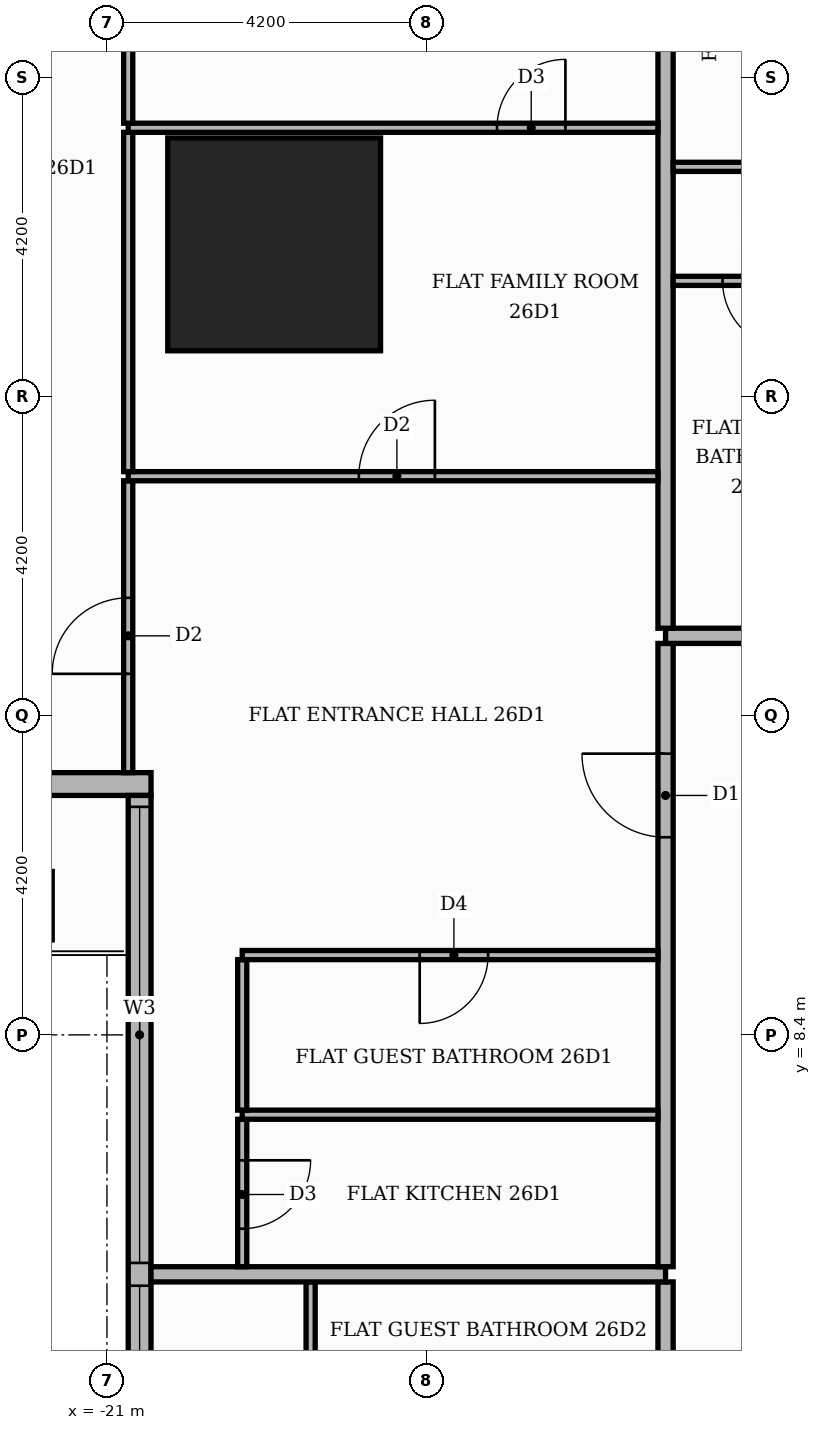
"""IFC4 building model, lengths in metres.
Left out: names, types, materials, properties, quantities, classifications, styles, units other than length and angle.
Written with IfcOpenShell. Run it as: python <this file> out.ifc"""

import sys

from ifc_helpers import new_model, si_unit, direction, frame, frame_2d, origin, origin_2d, place, context, subcontext, project, spatial, rectangle, extrude, element, fill, save


model = new_model("IFC4")
c1 = context("Model", 3, precision=1e-05, world=origin(), true_north=direction((0.0, 1.0)))
c2 = subcontext(c1, "Body", "Model", "MODEL_VIEW")
j1 = project(units=[si_unit("LENGTHUNIT", "METRE"), si_unit("PLANEANGLEUNIT", "RADIAN")], contexts=[c1])
p1 = place(None, origin())
s1 = spatial("IfcSite", under=j1, at=p1, CompositionType="ELEMENT")
p2 = place(p1, origin())
s2 = spatial("IfcBuilding", under=s1, at=p2, CompositionType="ELEMENT")
p3 = place(p2, frame((0.0, 0.0, 110.4)))
s3 = spatial("IfcBuildingStorey", under=s2, at=p3, CompositionType="ELEMENT", Elevation=110.4)
p4 = place(p3, frame((-18.8, 18.8, 0.0), z_axis=(0.0, 0.0, 1.0), x_axis=(1.0, 0.0, 0.0)))
e1 = element("IfcColumn", 1, at=p4, inside=s3, PredefinedType="COLUMN", context=c2, shape_type="SweptSolid", body=[
    extrude(rectangle(XDim=2.8, YDim=2.8, at=origin_2d()), origin(), (0.0, 0.0, 1.0), 3.9),
])
p5 = place(p3, frame((-25.42, 11.7, 0.0), z_axis=(0.0, 0.0, 1.0), x_axis=(1.0, 0.0, 0.0)))
e2 = element("IfcWall", 2, at=p5, inside=s3, PredefinedType="STANDARD", context=c2, shape_type="SweptSolid", body=[
    extrude(rectangle(XDim=5.0, YDim=0.3, at=frame_2d((2.5, 0.0))), origin(), (0.0, 0.0, 1.0), 3.48),
])
p6 = place(p5, frame((1.42, 0.0, 0.0)))
e3 = element("IfcOpeningElement", 3, at=p6, cuts=e2, PredefinedType="OPENING", context=c2, shape_type="SweptSolid", body=[
    extrude(rectangle(XDim=1.8, YDim=2.4, at=frame_2d((0.9, 1.2))), frame((0.0, 0.16, 0.0), z_axis=(0.0, -1.0, 0.0), x_axis=(1.0, 0.0, 0.0)), (0.0, 0.0, 1.0), 0.32),
])
p7 = place(p3, frame((-20.57, 11.55, 0.0), z_axis=(0.0, 0.0, 1.0), x_axis=(0.0, -1.0, 0.0)))
e4 = element("IfcWall", 4, at=p7, inside=s3, PredefinedType="STANDARD", context=c2, shape_type="SweptSolid", body=[
    extrude(rectangle(XDim=23.4, YDim=0.3, at=frame_2d((11.7, 0.0))), origin(), (0.0, 0.0, 1.0), 3.48),
])
p8 = place(p7, frame((0.15, 0.0, 0.9)))
e5 = element("IfcOpeningElement", 5, at=p8, cuts=e4, PredefinedType="OPENING", context=c2, shape_type="SweptSolid", body=[
    extrude(rectangle(XDim=6.0, YDim=2.1, at=frame_2d((3.0, 1.05))), frame((0.0, 0.16, 0.0), z_axis=(0.0, -1.0, 0.0), x_axis=(1.0, 0.0, 0.0)), (0.0, 0.0, 1.0), 0.32),
])
p9 = place(p7, frame((6.45, 0.0, 0.9)))
e6 = element("IfcOpeningElement", 6, at=p9, cuts=e4, PredefinedType="OPENING", context=c2, shape_type="SweptSolid", body=[
    extrude(rectangle(XDim=6.0, YDim=2.1, at=frame_2d((3.0, 1.05))), frame((0.0, 0.16, 0.0), z_axis=(0.0, -1.0, 0.0), x_axis=(1.0, 0.0, 0.0)), (0.0, 0.0, 1.0), 0.32),
])
p10 = place(p7, frame((12.75, 0.0, 0.9)))
e7 = element("IfcOpeningElement", 7, at=p10, cuts=e4, PredefinedType="OPENING", context=c2, shape_type="SweptSolid", body=[
    extrude(rectangle(XDim=6.0, YDim=2.1, at=frame_2d((3.0, 1.05))), frame((0.0, 0.16, 0.0), z_axis=(0.0, -1.0, 0.0), x_axis=(1.0, 0.0, 0.0)), (0.0, 0.0, 1.0), 0.32),
])
p11 = place(p7, frame((19.05, 0.0, 0.9)))
e8 = element("IfcOpeningElement", 8, at=p11, cuts=e4, PredefinedType="OPENING", context=c2, shape_type="SweptSolid", body=[
    extrude(rectangle(XDim=3.9, YDim=2.1, at=frame_2d((1.95, 1.05))), frame((0.0, 0.16, 0.0), z_axis=(0.0, -1.0, 0.0), x_axis=(1.0, 0.0, 0.0)), (0.0, 0.0, 1.0), 0.32),
])
p12 = place(p3, frame((-13.65, -13.55, 0.0), z_axis=(0.0, 0.0, 1.0), x_axis=(0.0, 1.0, 0.0)))
e9 = element("IfcWall", 9, at=p12, inside=s3, PredefinedType="PARTITIONING", context=c2, shape_type="SweptSolid", body=[
    extrude(rectangle(XDim=18.7, YDim=0.2, at=frame_2d((9.35, 0.0))), origin(), (0.0, 0.0, 1.0), 3.48),
])
p13 = place(p12, frame((14.05, 0.0, 0.0)))
e10 = element("IfcOpeningElement", 10, at=p13, cuts=e9, PredefinedType="OPENING", context=c2, shape_type="SweptSolid", body=[
    extrude(rectangle(XDim=1.1, YDim=2.4, at=frame_2d((0.55, 1.2))), frame((0.0, 0.11, 0.0), z_axis=(0.0, -1.0, 0.0), x_axis=(1.0, 0.0, 0.0)), (0.0, 0.0, 1.0), 0.22),
])
p14 = place(p3, frame((-18.32, 3.21, 0.0), z_axis=(0.0, 0.0, 1.0), x_axis=(0.0, 1.0, 0.0)))
e11 = element("IfcWall", 11, at=p14, inside=s3, PredefinedType="PARTITIONING", context=c2, shape_type="SweptSolid", body=[
    extrude(rectangle(XDim=1.94, YDim=0.12, at=frame_2d((0.97, 0.0))), origin(), (0.0, 0.0, 1.0), 3.48),
])
p15 = place(p3, frame((-20.42, 5.25, 0.0), z_axis=(0.0, 0.0, 1.0), x_axis=(1.0, 0.0, 0.0)))
e12 = element("IfcWall", 12, at=p15, inside=s3, PredefinedType="PARTITIONING", context=c2, shape_type="SweptSolid", body=[
    extrude(rectangle(XDim=6.77, YDim=0.2, at=frame_2d((3.385, 0.0))), origin(), (0.0, 0.0, 1.0), 3.48),
])
p16 = place(p3, frame((-19.22, 5.35, 0.0), z_axis=(0.0, 0.0, 1.0), x_axis=(0.0, 1.0, 0.0)))
e13 = element("IfcWall", 13, at=p16, inside=s3, PredefinedType="PARTITIONING", context=c2, shape_type="SweptSolid", body=[
    extrude(rectangle(XDim=1.94, YDim=0.12, at=frame_2d((0.97, 0.0))), origin(), (0.0, 0.0, 1.0), 3.48),
])
p17 = place(p16, frame((0.5, 0.0, 0.0)))
e14 = element("IfcOpeningElement", 14, at=p17, cuts=e13, PredefinedType="OPENING", context=c2, shape_type="SweptSolid", body=[
    extrude(rectangle(XDim=0.9, YDim=2.1, at=frame_2d((0.45, 1.05))), frame((0.0, 0.07, 0.0), z_axis=(0.0, -1.0, 0.0), x_axis=(1.0, 0.0, 0.0)), (0.0, 0.0, 1.0), 0.14),
])
p18 = place(p3, frame((-13.65, 5.35, 0.0), z_axis=(0.0, 0.0, 1.0), x_axis=(0.0, 1.0, 0.0)))
e15 = element("IfcWall", 15, at=p18, inside=s3, PredefinedType="PARTITIONING", context=c2, shape_type="SweptSolid", body=[
    extrude(rectangle(XDim=8.2, YDim=0.2, at=frame_2d((4.1, 0.0))), origin(), (0.0, 0.0, 1.0), 3.48),
])
p19 = place(p18, frame((5.65, 0.0, 0.0)))
e16 = element("IfcOpeningElement", 16, at=p19, cuts=e15, PredefinedType="OPENING", context=c2, shape_type="SweptSolid", body=[
    extrude(rectangle(XDim=1.1, YDim=2.4, at=frame_2d((0.55, 1.2))), frame((0.0, 0.11, 0.0), z_axis=(0.0, -1.0, 0.0), x_axis=(1.0, 0.0, 0.0)), (0.0, 0.0, 1.0), 0.22),
])
p20 = place(p3, frame((-19.22, 7.35, 0.0), z_axis=(0.0, 0.0, 1.0), x_axis=(1.0, 0.0, 0.0)))
e17 = element("IfcWall", 17, at=p20, inside=s3, PredefinedType="PARTITIONING", context=c2, shape_type="SweptSolid", body=[
    extrude(rectangle(XDim=5.47, YDim=0.12, at=frame_2d((2.735, 0.0))), origin(), (0.0, 0.0, 1.0), 3.48),
])
p21 = place(p3, frame((-19.22, 7.41, 0.0), z_axis=(0.0, 0.0, 1.0), x_axis=(0.0, 1.0, 0.0)))
e18 = element("IfcWall", 18, at=p21, inside=s3, PredefinedType="PARTITIONING", context=c2, shape_type="SweptSolid", body=[
    extrude(rectangle(XDim=1.98, YDim=0.12, at=frame_2d((0.99, 0.0))), origin(), (0.0, 0.0, 1.0), 3.48),
])
p22 = place(p3, frame((-19.22, 9.45, 0.0), z_axis=(0.0, 0.0, 1.0), x_axis=(1.0, 0.0, 0.0)))
e19 = element("IfcWall", 19, at=p22, inside=s3, PredefinedType="PARTITIONING", context=c2, shape_type="SweptSolid", body=[
    extrude(rectangle(XDim=5.47, YDim=0.12, at=frame_2d((2.735, 0.0))), origin(), (0.0, 0.0, 1.0), 3.48),
])
p23 = place(p22, frame((2.335, 0.0, 0.0)))
e20 = element("IfcOpeningElement", 20, at=p23, cuts=e19, PredefinedType="OPENING", context=c2, shape_type="SweptSolid", body=[
    extrude(rectangle(XDim=0.9, YDim=2.1, at=frame_2d((0.45, 1.05))), frame((0.0, 0.07, 0.0), z_axis=(0.0, -1.0, 0.0), x_axis=(1.0, 0.0, 0.0)), (0.0, 0.0, 1.0), 0.14),
])
p24 = place(p3, frame((-20.72, 11.85, 0.0), z_axis=(0.0, 0.0, 1.0), x_axis=(0.0, 1.0, 0.0)))
e21 = element("IfcWall", 21, at=p24, inside=s3, PredefinedType="PARTITIONING", context=c2, shape_type="SweptSolid", body=[
    extrude(rectangle(XDim=3.84, YDim=0.12, at=frame_2d((1.92, 0.0))), origin(), (0.0, 0.0, 1.0), 3.48),
])
p25 = place(p24, frame((1.3, 0.0, 0.0)))
e22 = element("IfcOpeningElement", 22, at=p25, cuts=e21, PredefinedType="OPENING", context=c2, shape_type="SweptSolid", body=[
    extrude(rectangle(XDim=1.0, YDim=2.1, at=frame_2d((0.5, 1.05))), frame((0.0, 0.07, 0.0), z_axis=(0.0, -1.0, 0.0), x_axis=(1.0, 0.0, 0.0)), (0.0, 0.0, 1.0), 0.14),
])
p26 = place(p3, frame((-13.65, 13.65, 0.0), z_axis=(0.0, 0.0, 1.0), x_axis=(1.0, 0.0, 0.0)))
e23 = element("IfcWall", 23, at=p26, inside=s3, PredefinedType="PARTITIONING", context=c2, shape_type="SweptSolid", body=[
    extrude(rectangle(XDim=39.07, YDim=0.2, at=frame_2d((19.535, 0.0))), origin(), (0.0, 0.0, 1.0), 3.48),
])
p27 = place(p26, frame((23.6, 0.0, 0.0)))
e24 = element("IfcOpeningElement", 24, at=p27, cuts=e23, PredefinedType="OPENING", context=c2, shape_type="SweptSolid", body=[
    extrude(rectangle(XDim=1.1, YDim=2.4, at=frame_2d((0.55, 1.2))), frame((0.0, 0.11, 0.0), z_axis=(0.0, -1.0, 0.0), x_axis=(1.0, 0.0, 0.0)), (0.0, 0.0, 1.0), 0.22),
])
p28 = place(p3, frame((-13.65, 13.75, 0.0), z_axis=(0.0, 0.0, 1.0), x_axis=(0.0, 1.0, 0.0)))
e25 = element("IfcWall", 25, at=p28, inside=s3, PredefinedType="PARTITIONING", context=c2, shape_type="SweptSolid", body=[
    extrude(rectangle(XDim=11.67, YDim=0.2, at=frame_2d((5.835, 0.0))), origin(), (0.0, 0.0, 1.0), 3.48),
])
p29 = place(p3, frame((-20.72, 15.75, 0.0), z_axis=(0.0, 0.0, 1.0), x_axis=(1.0, 0.0, 0.0)))
e26 = element("IfcWall", 26, at=p29, inside=s3, PredefinedType="PARTITIONING", context=c2, shape_type="SweptSolid", body=[
    extrude(rectangle(XDim=6.97, YDim=0.12, at=frame_2d((3.485, 0.0))), origin(), (0.0, 0.0, 1.0), 3.48),
])
p30 = place(p29, frame((3.035, 0.0, 0.0)))
e27 = element("IfcOpeningElement", 27, at=p30, cuts=e26, PredefinedType="OPENING", context=c2, shape_type="SweptSolid", body=[
    extrude(rectangle(XDim=1.0, YDim=2.1, at=frame_2d((0.5, 1.05))), frame((0.0, 0.07, 0.0), z_axis=(0.0, -1.0, 0.0), x_axis=(1.0, 0.0, 0.0)), (0.0, 0.0, 1.0), 0.14),
])
p31 = place(p3, frame((-20.72, 15.81, 0.0), z_axis=(0.0, 0.0, 1.0), x_axis=(0.0, 1.0, 0.0)))
e28 = element("IfcWall", 28, at=p31, inside=s3, PredefinedType="PARTITIONING", context=c2, shape_type="SweptSolid", body=[
    extrude(rectangle(XDim=4.464, YDim=0.12, at=frame_2d((2.232, 0.0))), origin(), (0.0, 0.0, 1.0), 3.48),
])
p32 = place(p3, frame((-13.55, 18.32, 0.0), z_axis=(0.0, 0.0, 1.0), x_axis=(1.0, 0.0, 0.0)))
e29 = element("IfcWall", 29, at=p32, inside=s3, PredefinedType="PARTITIONING", context=c2, shape_type="SweptSolid", body=[
    extrude(rectangle(XDim=20.9, YDim=0.12, at=frame_2d((10.45, 0.0))), origin(), (0.0, 0.0, 1.0), 3.48),
])
p33 = place(p32, frame((17.525, 0.0, 0.0)))
e30 = element("IfcOpeningElement", 30, at=p33, cuts=e29, PredefinedType="OPENING", context=c2, shape_type="SweptSolid", body=[
    extrude(rectangle(XDim=0.9, YDim=2.1, at=frame_2d((0.45, 1.05))), frame((0.0, 0.07, 0.0), z_axis=(0.0, -1.0, 0.0), x_axis=(1.0, 0.0, 0.0)), (0.0, 0.0, 1.0), 0.14),
])
p34 = place(p32, frame((12.5, 0.0, 0.0)))
e31 = element("IfcOpeningElement", 31, at=p34, cuts=e29, PredefinedType="OPENING", context=c2, shape_type="SweptSolid", body=[
    extrude(rectangle(XDim=0.9, YDim=2.1, at=frame_2d((0.45, 1.05))), frame((0.0, 0.07, 0.0), z_axis=(0.0, -1.0, 0.0), x_axis=(1.0, 0.0, 0.0)), (0.0, 0.0, 1.0), 0.14),
])
p35 = place(p32, frame((7.025, 0.0, 0.0)))
e32 = element("IfcOpeningElement", 32, at=p35, cuts=e29, PredefinedType="OPENING", context=c2, shape_type="SweptSolid", body=[
    extrude(rectangle(XDim=0.9, YDim=2.1, at=frame_2d((0.45, 1.05))), frame((0.0, 0.07, 0.0), z_axis=(0.0, -1.0, 0.0), x_axis=(1.0, 0.0, 0.0)), (0.0, 0.0, 1.0), 0.14),
])
p36 = place(p32, frame((2.75, 0.0, 0.0)))
e33 = element("IfcOpeningElement", 33, at=p36, cuts=e29, PredefinedType="OPENING", context=c2, shape_type="SweptSolid", body=[
    extrude(rectangle(XDim=0.9, YDim=2.1, at=frame_2d((0.45, 1.05))), frame((0.0, 0.07, 0.0), z_axis=(0.0, -1.0, 0.0), x_axis=(1.0, 0.0, 0.0)), (0.0, 0.0, 1.0), 0.14),
])
p37 = place(p32, frame((0.65, 0.0, 0.0)))
e34 = element("IfcOpeningElement", 34, at=p37, cuts=e29, PredefinedType="OPENING", context=c2, shape_type="SweptSolid", body=[
    extrude(rectangle(XDim=0.9, YDim=2.1, at=frame_2d((0.45, 1.05))), frame((0.0, 0.07, 0.0), z_axis=(0.0, -1.0, 0.0), x_axis=(1.0, 0.0, 0.0)), (0.0, 0.0, 1.0), 0.14),
])
p38 = place(p3, frame((-13.55, 19.82, 0.0), z_axis=(0.0, 0.0, 1.0), x_axis=(1.0, 0.0, 0.0)))
e35 = element("IfcWall", 35, at=p38, inside=s3, PredefinedType="PARTITIONING", context=c2, shape_type="SweptSolid", body=[
    extrude(rectangle(XDim=30.95, YDim=0.12, at=frame_2d((15.475, 0.0))), origin(), (0.0, 0.0, 1.0), 3.48),
])
p39 = place(p38, frame((25.65, 0.0, 0.0)))
e36 = element("IfcOpeningElement", 36, at=p39, cuts=e35, PredefinedType="OPENING", context=c2, shape_type="SweptSolid", body=[
    extrude(rectangle(XDim=1.0, YDim=2.1, at=frame_2d((0.5, 1.05))), frame((0.0, 0.07, 0.0), z_axis=(0.0, -1.0, 0.0), x_axis=(1.0, 0.0, 0.0)), (0.0, 0.0, 1.0), 0.14),
])
p40 = place(p38, frame((20.4, 0.0, 0.0)))
e37 = element("IfcOpeningElement", 37, at=p40, cuts=e35, PredefinedType="OPENING", context=c2, shape_type="SweptSolid", body=[
    extrude(rectangle(XDim=1.0, YDim=2.1, at=frame_2d((0.5, 1.05))), frame((0.0, 0.07, 0.0), z_axis=(0.0, -1.0, 0.0), x_axis=(1.0, 0.0, 0.0)), (0.0, 0.0, 1.0), 0.14),
])
p41 = place(p38, frame((13.1, 0.0, 0.0)))
e38 = element("IfcOpeningElement", 38, at=p41, cuts=e35, PredefinedType="OPENING", context=c2, shape_type="SweptSolid", body=[
    extrude(rectangle(XDim=0.9, YDim=2.1, at=frame_2d((0.45, 1.05))), frame((0.0, 0.07, 0.0), z_axis=(0.0, -1.0, 0.0), x_axis=(1.0, 0.0, 0.0)), (0.0, 0.0, 1.0), 0.14),
])
p42 = place(p38, frame((3.65, 0.0, 0.0)))
e39 = element("IfcOpeningElement", 39, at=p42, cuts=e35, PredefinedType="OPENING", context=c2, shape_type="SweptSolid", body=[
    extrude(rectangle(XDim=0.9, YDim=2.1, at=frame_2d((0.45, 1.05))), frame((0.0, 0.07, 0.0), z_axis=(0.0, -1.0, 0.0), x_axis=(1.0, 0.0, 0.0)), (0.0, 0.0, 1.0), 0.14),
])
p43 = place(p3, frame((-20.72, 20.334, 0.0), z_axis=(0.0, 0.0, 1.0), x_axis=(1.0, 0.0, 0.0)))
e40 = element("IfcWall", 40, at=p43, inside=s3, PredefinedType="PARTITIONING", context=c2, shape_type="SweptSolid", body=[
    extrude(rectangle(XDim=6.97, YDim=0.12, at=frame_2d((3.485, 0.0))), origin(), (0.0, 0.0, 1.0), 3.48),
])
p44 = place(p43, frame((4.853, 0.0, 0.0)))
e41 = element("IfcOpeningElement", 41, at=p44, cuts=e40, PredefinedType="OPENING", context=c2, shape_type="SweptSolid", body=[
    extrude(rectangle(XDim=0.9, YDim=2.1, at=frame_2d((0.45, 1.05))), frame((0.0, 0.07, 0.0), z_axis=(0.0, -1.0, 0.0), x_axis=(1.0, 0.0, 0.0)), (0.0, 0.0, 1.0), 0.14),
])
p45 = place(p3, frame((-20.72, 20.394, 0.0), z_axis=(0.0, 0.0, 1.0), x_axis=(0.0, 1.0, 0.0)))
e42 = element("IfcWall", 42, at=p45, inside=s3, PredefinedType="PARTITIONING", context=c2, shape_type="SweptSolid", body=[
    extrude(rectangle(XDim=5.026, YDim=0.12, at=frame_2d((2.513, 0.0))), origin(), (0.0, 0.0, 1.0), 3.48),
])
p46 = place(p8, origin())
e43 = element("IfcWindow", 43, at=p46, inside=s3, PartitioningType="SINGLE_PANEL", PredefinedType="WINDOW", context=c2, shape_type="SweptSolid", body=[
    extrude(rectangle(XDim=6.0, YDim=2.1, at=frame_2d((3.0, 1.05))), frame((0.0, 0.03, 0.0), z_axis=(0.0, -1.0, 0.0), x_axis=(1.0, 0.0, 0.0)), (0.0, 0.0, 1.0), 0.06),
])
fill(e5, e43)
p47 = place(p9, origin())
e44 = element("IfcWindow", 44, at=p47, inside=s3, PartitioningType="SINGLE_PANEL", PredefinedType="WINDOW", context=c2, shape_type="SweptSolid", body=[
    extrude(rectangle(XDim=6.0, YDim=2.1, at=frame_2d((3.0, 1.05))), frame((0.0, 0.03, 0.0), z_axis=(0.0, -1.0, 0.0), x_axis=(1.0, 0.0, 0.0)), (0.0, 0.0, 1.0), 0.06),
])
fill(e6, e44)
p48 = place(p37, frame((0.9, 0.0, 0.0), z_axis=(0.0, 0.0, 1.0), x_axis=(-1.0, 0.0, 0.0)))
e45 = element("IfcDoor", 45, at=p48, inside=s3, OperationType="SINGLE_SWING_RIGHT", PredefinedType="DOOR", context=c2, shape_type="SweptSolid", body=[
    extrude(rectangle(XDim=0.9, YDim=2.1, at=frame_2d((0.45, 1.05))), frame((0.0, 0.025, 0.0), z_axis=(0.0, -1.0, 0.0), x_axis=(1.0, 0.0, 0.0)), (0.0, 0.0, 1.0), 0.05),
])
fill(e34, e45)
p49 = place(p19, origin())
e46 = element("IfcDoor", 46, at=p49, inside=s3, OperationType="SINGLE_SWING_RIGHT", PredefinedType="DOOR", context=c2, shape_type="SweptSolid", body=[
    extrude(rectangle(XDim=1.1, YDim=2.4, at=frame_2d((0.55, 1.2))), frame((0.0, 0.025, 0.0), z_axis=(0.0, -1.0, 0.0), x_axis=(1.0, 0.0, 0.0)), (0.0, 0.0, 1.0), 0.05),
])
fill(e16, e46)
p50 = place(p44, origin())
e47 = element("IfcDoor", 47, at=p50, inside=s3, OperationType="SINGLE_SWING_RIGHT", PredefinedType="DOOR", context=c2, shape_type="SweptSolid", body=[
    extrude(rectangle(XDim=0.9, YDim=2.1, at=frame_2d((0.45, 1.05))), frame((0.0, 0.025, 0.0), z_axis=(0.0, -1.0, 0.0), x_axis=(1.0, 0.0, 0.0)), (0.0, 0.0, 1.0), 0.05),
])
fill(e41, e47)
p51 = place(p30, origin())
e48 = element("IfcDoor", 48, at=p51, inside=s3, OperationType="SINGLE_SWING_RIGHT", PredefinedType="DOOR", context=c2, shape_type="SweptSolid", body=[
    extrude(rectangle(XDim=1.0, YDim=2.1, at=frame_2d((0.5, 1.05))), frame((0.0, 0.025, 0.0), z_axis=(0.0, -1.0, 0.0), x_axis=(1.0, 0.0, 0.0)), (0.0, 0.0, 1.0), 0.05),
])
fill(e27, e48)
p52 = place(p23, frame((0.9, 0.0, 0.0), z_axis=(0.0, 0.0, 1.0), x_axis=(-1.0, 0.0, 0.0)))
e49 = element("IfcDoor", 49, at=p52, inside=s3, OperationType="SINGLE_SWING_LEFT", PredefinedType="DOOR", context=c2, shape_type="SweptSolid", body=[
    extrude(rectangle(XDim=0.9, YDim=2.1, at=frame_2d((0.45, 1.05))), frame((0.0, 0.025, 0.0), z_axis=(0.0, -1.0, 0.0), x_axis=(1.0, 0.0, 0.0)), (0.0, 0.0, 1.0), 0.05),
])
fill(e20, e49)
p53 = place(p17, frame((0.9, 0.0, 0.0), z_axis=(0.0, 0.0, 1.0), x_axis=(-1.0, 0.0, 0.0)))
e50 = element("IfcDoor", 50, at=p53, inside=s3, OperationType="SINGLE_SWING_RIGHT", PredefinedType="DOOR", context=c2, shape_type="SweptSolid", body=[
    extrude(rectangle(XDim=0.9, YDim=2.1, at=frame_2d((0.45, 1.05))), frame((0.0, 0.025, 0.0), z_axis=(0.0, -1.0, 0.0), x_axis=(1.0, 0.0, 0.0)), (0.0, 0.0, 1.0), 0.05),
])
fill(e14, e50)
p54 = place(p25, origin())
e51 = element("IfcDoor", 51, at=p54, inside=s3, OperationType="SINGLE_SWING_LEFT", PredefinedType="DOOR", context=c2, shape_type="SweptSolid", body=[
    extrude(rectangle(XDim=1.0, YDim=2.1, at=frame_2d((0.5, 1.05))), frame((0.0, 0.025, 0.0), z_axis=(0.0, -1.0, 0.0), x_axis=(1.0, 0.0, 0.0)), (0.0, 0.0, 1.0), 0.05),
])
fill(e22, e51)
save(model, sys.argv[1])
